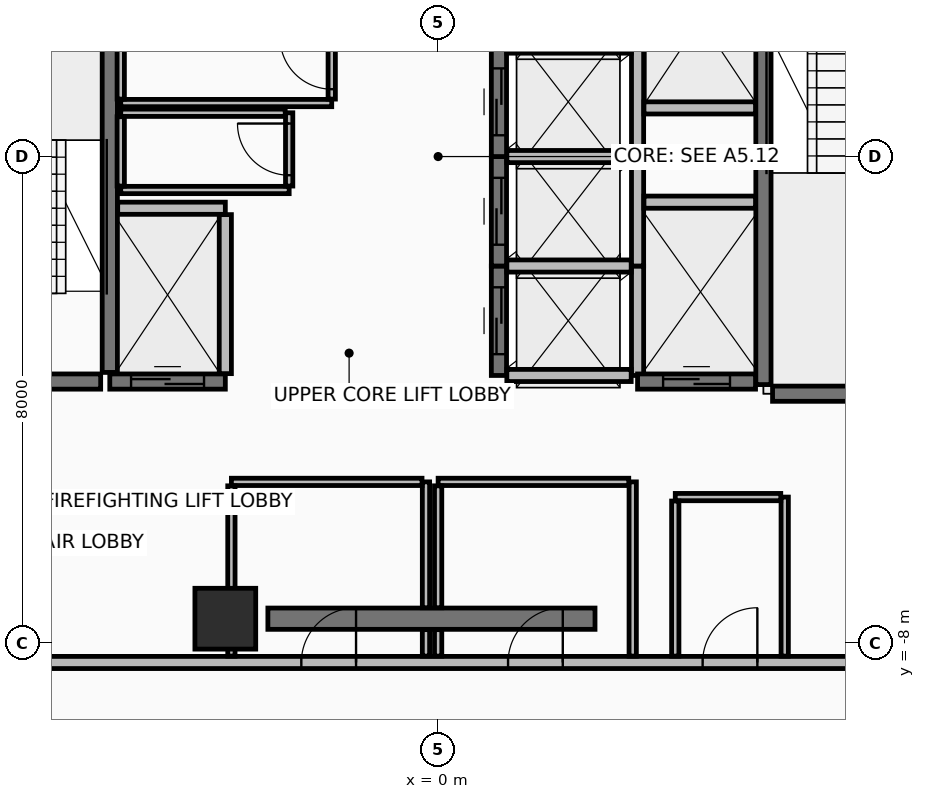
"""IFC4 building model, lengths in metres.
Left out: names, types, materials, properties, quantities, classifications, styles, units other than length and angle.
Written with IfcOpenShell. Run it as: python <this file> out.ifc"""

import sys

from ifc_helpers import new_model, si_unit, direction, frame, frame_2d, origin, origin_2d, place, context, subcontext, project, spatial, rectangle, extrude, element, fill, save


model = new_model("IFC4")
c1 = context("Model", 3, precision=1e-05, world=origin(), true_north=direction((0.0, 1.0)))
c2 = subcontext(c1, "Body", "Model", "MODEL_VIEW")
j1 = project(units=[si_unit("LENGTHUNIT", "METRE"), si_unit("PLANEANGLEUNIT", "RADIAN")], contexts=[c1])
p1 = place(None, origin())
s1 = spatial("IfcSite", under=j1, at=p1, CompositionType="ELEMENT")
p2 = place(p1, origin())
s2 = spatial("IfcBuilding", under=s1, at=p2, CompositionType="ELEMENT")
p3 = place(p2, frame((0.0, 0.0, 264.2)))
s3 = spatial("IfcBuildingStorey", under=s2, at=p3, CompositionType="ELEMENT", Elevation=264.2)
p4 = place(p3, frame((-3.5, -7.6, 0.0), z_axis=(0.0, 0.0, 1.0), x_axis=(1.0, 0.0, 0.0)))
e1 = element("IfcColumn", 1, at=p4, inside=s3, PredefinedType="COLUMN", context=c2, shape_type="SweptSolid", body=[
    extrude(rectangle(XDim=1.0, YDim=1.0, at=origin_2d()), origin(), (0.0, 0.0, 1.0), 3.6),
])
p5 = place(p3, frame((-2.8, -7.6, 0.0), z_axis=(0.0, 0.0, 1.0), x_axis=(1.0, 0.0, 0.0)))
e2 = element("IfcWall", 2, at=p5, inside=s3, PredefinedType="SHEAR", context=c2, shape_type="SweptSolid", body=[
    extrude(rectangle(XDim=5.38, YDim=0.35, at=frame_2d((2.69, 0.0))), origin(), (0.0, 0.0, 1.0), 3.42),
])
p6 = place(p3, frame((-9.62, -8.32, 0.0), z_axis=(0.0, 0.0, 1.0), x_axis=(1.0, 0.0, 0.0)))
e3 = element("IfcWall", 3, at=p6, inside=s3, PredefinedType="PARTITIONING", context=c2, shape_type="SweptSolid", body=[
    extrude(rectangle(XDim=19.24, YDim=0.2, at=frame_2d((9.62, 0.0))), origin(), (0.0, 0.0, 1.0), 2.915),
])
p7 = place(p6, frame((7.37, 0.0, 0.0)))
e4 = element("IfcOpeningElement", 4, at=p7, cuts=e3, PredefinedType="OPENING", context=c2, shape_type="SweptSolid", body=[
    extrude(rectangle(XDim=0.9, YDim=2.1, at=frame_2d((0.45, 1.05))), frame((0.0, 0.11, 0.0), z_axis=(0.0, -1.0, 0.0), x_axis=(1.0, 0.0, 0.0)), (0.0, 0.0, 1.0), 0.22),
])
p8 = place(p6, frame((10.77, 0.0, 0.0)))
e5 = element("IfcOpeningElement", 5, at=p8, cuts=e3, PredefinedType="OPENING", context=c2, shape_type="SweptSolid", body=[
    extrude(rectangle(XDim=0.9, YDim=2.1, at=frame_2d((0.45, 1.05))), frame((0.0, 0.11, 0.0), z_axis=(0.0, -1.0, 0.0), x_axis=(1.0, 0.0, 0.0)), (0.0, 0.0, 1.0), 0.22),
])
p9 = place(p6, frame((13.97, 0.0, 0.0)))
e6 = element("IfcOpeningElement", 6, at=p9, cuts=e3, PredefinedType="OPENING", context=c2, shape_type="SweptSolid", body=[
    extrude(rectangle(XDim=0.9, YDim=2.1, at=frame_2d((0.45, 1.05))), frame((0.0, 0.11, 0.0), z_axis=(0.0, -1.0, 0.0), x_axis=(1.0, 0.0, 0.0)), (0.0, 0.0, 1.0), 0.22),
])
p10 = place(p3, frame((-5.4, -3.55, 0.0), z_axis=(0.0, 0.0, 1.0), x_axis=(0.0, 1.0, 0.0)))
e7 = element("IfcWall", 7, at=p10, inside=s3, PredefinedType="SHEAR", context=c2, shape_type="SweptSolid", body=[
    extrude(rectangle(XDim=7.3, YDim=0.25, at=frame_2d((3.65, 0.0))), origin(), (0.0, 0.0, 1.0), 3.42),
])
p11 = place(p3, frame((-8.5, -3.7, 0.0), z_axis=(0.0, 0.0, 1.0), x_axis=(1.0, 0.0, 0.0)))
e8 = element("IfcWall", 8, at=p11, inside=s3, PredefinedType="SHEAR", context=c2, shape_type="SweptSolid", body=[
    extrude(rectangle(XDim=2.95, YDim=0.25, at=frame_2d((1.475, 0.0))), origin(), (0.0, 0.0, 1.0), 3.42),
])
p12 = place(p11, frame((0.9, 0.0, 0.0)))
e9 = element("IfcOpeningElement", 9, at=p12, cuts=e8, PredefinedType="OPENING", context=c2, shape_type="SweptSolid", body=[
    extrude(rectangle(XDim=1.1, YDim=2.15, at=frame_2d((0.55, 1.075))), frame((0.0, 0.135, 0.0), z_axis=(0.0, -1.0, 0.0), x_axis=(1.0, 0.0, 0.0)), (0.0, 0.0, 1.0), 0.27),
])
p13 = place(p3, frame((5.35, -3.75, 0.0), z_axis=(0.0, 0.0, 1.0), x_axis=(0.0, 1.0, 0.0)))
e10 = element("IfcWall", 10, at=p13, inside=s3, PredefinedType="SHEAR", context=c2, shape_type="SweptSolid", body=[
    extrude(rectangle(XDim=7.3, YDim=0.25, at=frame_2d((3.65, 0.0))), origin(), (0.0, 0.0, 1.0), 3.42),
])
p14 = place(p3, frame((5.5, -3.9, 0.0), z_axis=(0.0, 0.0, 1.0), x_axis=(1.0, 0.0, 0.0)))
e11 = element("IfcWall", 11, at=p14, inside=s3, PredefinedType="SHEAR", context=c2, shape_type="SweptSolid", body=[
    extrude(rectangle(XDim=3.0, YDim=0.25, at=frame_2d((1.5, 0.0))), origin(), (0.0, 0.0, 1.0), 3.42),
])
p15 = place(p3, frame((1.0, -3.6, 0.0), z_axis=(0.0, 0.0, 1.0), x_axis=(0.0, 1.0, 0.0)))
e12 = element("IfcWall", 12, at=p15, inside=s3, PredefinedType="SHEAR", context=c2, shape_type="SweptSolid", body=[
    extrude(rectangle(XDim=1.8, YDim=0.25, at=frame_2d((0.9, 0.0))), origin(), (0.0, 0.0, 1.0), 3.42),
])
p16 = place(p15, frame((0.35, 0.0, 0.0)))
e13 = element("IfcOpeningElement", 13, at=p16, cuts=e12, PredefinedType="OPENING", context=c2, shape_type="SweptSolid", body=[
    extrude(rectangle(XDim=1.1, YDim=2.2, at=frame_2d((0.55, 1.1))), frame((0.0, 0.135, 0.0), z_axis=(0.0, -1.0, 0.0), x_axis=(1.0, 0.0, 0.0)), (0.0, 0.0, 1.0), 0.27),
])
p17 = place(p3, frame((3.28, -3.6, 0.0), z_axis=(0.0, 0.0, 1.0), x_axis=(0.0, 1.0, 0.0)))
e14 = element("IfcWall", 14, at=p17, inside=s3, PredefinedType="PARTITIONING", context=c2, shape_type="SweptSolid", body=[
    extrude(rectangle(XDim=1.8, YDim=0.2, at=frame_2d((0.9, 0.0))), origin(), (0.0, 0.0, 1.0), 3.42),
])
for number, where, z_axis, x_axis in (
    (15, (1.13, -3.6, 0.0), (0.0, 0.0, 1.0), (1.0, 0.0, 0.0)),
    (16, (1.13, -1.8, 0.0), (0.0, 0.0, 1.0), (1.0, 0.0, 0.0)),
):
    element("IfcWall", number, at=place(p3, frame(where, z_axis=z_axis, x_axis=x_axis)), inside=s3, PredefinedType="PARTITIONING", context=c2, shape_type="SweptSolid", body=[
        extrude(rectangle(XDim=2.045, YDim=0.2, at=frame_2d((1.022, 0.0))), origin(), (0.0, 0.0, 1.0), 3.42),
    ])
p18 = place(p3, frame((1.0, -1.8, 0.0), z_axis=(0.0, 0.0, 1.0), x_axis=(0.0, 1.0, 0.0)))
e17 = element("IfcWall", 17, at=p18, inside=s3, PredefinedType="SHEAR", context=c2, shape_type="SweptSolid", body=[
    extrude(rectangle(XDim=1.8, YDim=0.25, at=frame_2d((0.9, 0.0))), origin(), (0.0, 0.0, 1.0), 3.42),
])
p19 = place(p18, frame((0.35, 0.0, 0.0)))
e18 = element("IfcOpeningElement", 18, at=p19, cuts=e17, PredefinedType="OPENING", context=c2, shape_type="SweptSolid", body=[
    extrude(rectangle(XDim=1.1, YDim=2.2, at=frame_2d((0.55, 1.1))), frame((0.0, 0.135, 0.0), z_axis=(0.0, -1.0, 0.0), x_axis=(1.0, 0.0, 0.0)), (0.0, 0.0, 1.0), 0.27),
])
p20 = place(p3, frame((3.28, -1.8, 0.0), z_axis=(0.0, 0.0, 1.0), x_axis=(0.0, 1.0, 0.0)))
e19 = element("IfcWall", 19, at=p20, inside=s3, PredefinedType="PARTITIONING", context=c2, shape_type="SweptSolid", body=[
    extrude(rectangle(XDim=1.8, YDim=0.2, at=frame_2d((0.9, 0.0))), origin(), (0.0, 0.0, 1.0), 3.42),
])
p21 = place(p3, frame((1.13, 0.0, 0.0), z_axis=(0.0, 0.0, 1.0), x_axis=(1.0, 0.0, 0.0)))
e20 = element("IfcWall", 20, at=p21, inside=s3, PredefinedType="PARTITIONING", context=c2, shape_type="SweptSolid", body=[
    extrude(rectangle(XDim=2.045, YDim=0.2, at=frame_2d((1.022, 0.0))), origin(), (0.0, 0.0, 1.0), 3.42),
])
p22 = place(p3, frame((1.0, 0.0, 0.0), z_axis=(0.0, 0.0, 1.0), x_axis=(0.0, 1.0, 0.0)))
e21 = element("IfcWall", 21, at=p22, inside=s3, PredefinedType="SHEAR", context=c2, shape_type="SweptSolid", body=[
    extrude(rectangle(XDim=1.8, YDim=0.25, at=frame_2d((0.9, 0.0))), origin(), (0.0, 0.0, 1.0), 3.42),
])
p23 = place(p22, frame((0.35, 0.0, 0.0)))
e22 = element("IfcOpeningElement", 22, at=p23, cuts=e21, PredefinedType="OPENING", context=c2, shape_type="SweptSolid", body=[
    extrude(rectangle(XDim=1.1, YDim=2.2, at=frame_2d((0.55, 1.1))), frame((0.0, 0.135, 0.0), z_axis=(0.0, -1.0, 0.0), x_axis=(1.0, 0.0, 0.0)), (0.0, 0.0, 1.0), 0.27),
])
p24 = place(p3, frame((3.28, 0.0, 0.0), z_axis=(0.0, 0.0, 1.0), x_axis=(0.0, 1.0, 0.0)))
e23 = element("IfcWall", 23, at=p24, inside=s3, PredefinedType="PARTITIONING", context=c2, shape_type="SweptSolid", body=[
    extrude(rectangle(XDim=1.8, YDim=0.2, at=frame_2d((0.9, 0.0))), origin(), (0.0, 0.0, 1.0), 3.42),
])
p25 = place(p3, frame((1.13, 1.8, 0.0), z_axis=(0.0, 0.0, 1.0), x_axis=(1.0, 0.0, 0.0)))
e24 = element("IfcWall", 24, at=p25, inside=s3, PredefinedType="PARTITIONING", context=c2, shape_type="SweptSolid", body=[
    extrude(rectangle(XDim=2.045, YDim=0.2, at=frame_2d((1.022, 0.0))), origin(), (0.0, 0.0, 1.0), 3.42),
])
p26 = place(p3, frame((-5.4, -3.7, 0.0), z_axis=(0.0, 0.0, 1.0), x_axis=(1.0, 0.0, 0.0)))
e25 = element("IfcWall", 25, at=p26, inside=s3, PredefinedType="SHEAR", context=c2, shape_type="SweptSolid", body=[
    extrude(rectangle(XDim=1.9, YDim=0.25, at=frame_2d((0.95, 0.0))), origin(), (0.0, 0.0, 1.0), 3.42),
])
p27 = place(p26, frame((0.35, 0.0, 0.0)))
e26 = element("IfcOpeningElement", 26, at=p27, cuts=e25, PredefinedType="OPENING", context=c2, shape_type="SweptSolid", body=[
    extrude(rectangle(XDim=1.2, YDim=2.2, at=frame_2d((0.6, 1.1))), frame((0.0, 0.135, 0.0), z_axis=(0.0, -1.0, 0.0), x_axis=(1.0, 0.0, 0.0)), (0.0, 0.0, 1.0), 0.27),
])
p28 = place(p3, frame((-5.27, -0.85, 0.0), z_axis=(0.0, 0.0, 1.0), x_axis=(1.0, 0.0, 0.0)))
e27 = element("IfcWall", 27, at=p28, inside=s3, PredefinedType="PARTITIONING", context=c2, shape_type="SweptSolid", body=[
    extrude(rectangle(XDim=1.77, YDim=0.2, at=frame_2d((0.885, 0.0))), origin(), (0.0, 0.0, 1.0), 3.42),
])
p29 = place(p3, frame((-3.5, -3.57, 0.0), z_axis=(0.0, 0.0, 1.0), x_axis=(0.0, 1.0, 0.0)))
e28 = element("IfcWall", 28, at=p29, inside=s3, PredefinedType="PARTITIONING", context=c2, shape_type="SweptSolid", body=[
    extrude(rectangle(XDim=2.615, YDim=0.2, at=frame_2d((1.308, 0.0))), origin(), (0.0, 0.0, 1.0), 3.42),
])
p30 = place(p3, frame((3.385, 0.8, 0.0), z_axis=(0.0, 0.0, 1.0), x_axis=(1.0, 0.0, 0.0)))
e29 = element("IfcWall", 29, at=p30, inside=s3, PredefinedType="PARTITIONING", context=c2, shape_type="SweptSolid", body=[
    extrude(rectangle(XDim=1.835, YDim=0.2, at=frame_2d((0.917, 0.0))), origin(), (0.0, 0.0, 1.0), 3.42),
])
p31 = place(p3, frame((3.28, -3.7, 0.0), z_axis=(0.0, 0.0, 1.0), x_axis=(1.0, 0.0, 0.0)))
e30 = element("IfcWall", 30, at=p31, inside=s3, PredefinedType="SHEAR", context=c2, shape_type="SweptSolid", body=[
    extrude(rectangle(XDim=1.94, YDim=0.25, at=frame_2d((0.97, 0.0))), origin(), (0.0, 0.0, 1.0), 3.42),
])
p32 = place(p31, frame((0.42, 0.0, 0.0)))
e31 = element("IfcOpeningElement", 31, at=p32, cuts=e30, PredefinedType="OPENING", context=c2, shape_type="SweptSolid", body=[
    extrude(rectangle(XDim=1.1, YDim=2.2, at=frame_2d((0.55, 1.1))), frame((0.0, 0.135, 0.0), z_axis=(0.0, -1.0, 0.0), x_axis=(1.0, 0.0, 0.0)), (0.0, 0.0, 1.0), 0.27),
])
p33 = place(p3, frame((3.385, -0.75, 0.0), z_axis=(0.0, 0.0, 1.0), x_axis=(1.0, 0.0, 0.0)))
e32 = element("IfcWall", 32, at=p33, inside=s3, PredefinedType="PARTITIONING", context=c2, shape_type="SweptSolid", body=[
    extrude(rectangle(XDim=1.835, YDim=0.2, at=frame_2d((0.917, 0.0))), origin(), (0.0, 0.0, 1.0), 3.42),
])
p34 = place(p3, frame((-5.22, 0.88, 0.0), z_axis=(0.0, 0.0, 1.0), x_axis=(1.0, 0.0, 0.0)))
e33 = element("IfcWall", 33, at=p34, inside=s3, PredefinedType="PARTITIONING", context=c2, shape_type="SweptSolid", body=[
    extrude(rectangle(XDim=3.47, YDim=0.12, at=frame_2d((1.735, 0.0))), origin(), (0.0, 0.0, 1.0), 3.42),
])
p35 = place(p3, frame((-1.75, 0.945, 0.0), z_axis=(0.0, 0.0, 1.0), x_axis=(0.0, 1.0, 0.0)))
e34 = element("IfcWall", 34, at=p35, inside=s3, PredefinedType="PARTITIONING", context=c2, shape_type="SweptSolid", body=[
    extrude(rectangle(XDim=1.175, YDim=0.12, at=frame_2d((0.587, 0.0))), origin(), (0.0, 0.0, 1.0), 3.42),
])
p36 = place(p35, frame((0.163, 0.0, 0.0)))
e35 = element("IfcOpeningElement", 35, at=p36, cuts=e34, PredefinedType="OPENING", context=c2, shape_type="SweptSolid", body=[
    extrude(rectangle(XDim=0.85, YDim=2.1, at=frame_2d((0.425, 1.05))), frame((0.0, 0.07, 0.0), z_axis=(0.0, -1.0, 0.0), x_axis=(1.0, 0.0, 0.0)), (0.0, 0.0, 1.0), 0.14),
])
p37 = place(p3, frame((-5.22, 2.055, 0.0), z_axis=(0.0, 0.0, 1.0), x_axis=(0.0, -1.0, 0.0)))
e36 = element("IfcWall", 36, at=p37, inside=s3, PredefinedType="PARTITIONING", context=c2, shape_type="SweptSolid", body=[
    extrude(rectangle(XDim=1.11, YDim=0.12, at=frame_2d((0.555, 0.0))), origin(), (0.0, 0.0, 1.0), 3.42),
])
p38 = place(p3, frame((-5.22, -0.55, 0.0), z_axis=(0.0, 0.0, 1.0), x_axis=(1.0, 0.0, 0.0)))
e37 = element("IfcWall", 37, at=p38, inside=s3, PredefinedType="PARTITIONING", context=c2, shape_type="SweptSolid", body=[
    extrude(rectangle(XDim=2.77, YDim=0.12, at=frame_2d((1.385, 0.0))), origin(), (0.0, 0.0, 1.0), 3.42),
])
p39 = place(p3, frame((-2.45, -0.485, 0.0), z_axis=(0.0, 0.0, 1.0), x_axis=(0.0, 1.0, 0.0)))
e38 = element("IfcWall", 38, at=p39, inside=s3, PredefinedType="PARTITIONING", context=c2, shape_type="SweptSolid", body=[
    extrude(rectangle(XDim=1.205, YDim=0.12, at=frame_2d((0.603, 0.0))), origin(), (0.0, 0.0, 1.0), 3.42),
])
p40 = place(p39, frame((0.178, 0.0, 0.0)))
e39 = element("IfcOpeningElement", 39, at=p40, cuts=e38, PredefinedType="OPENING", context=c2, shape_type="SweptSolid", body=[
    extrude(rectangle(XDim=0.85, YDim=2.1, at=frame_2d((0.425, 1.05))), frame((0.0, 0.07, 0.0), z_axis=(0.0, -1.0, 0.0), x_axis=(1.0, 0.0, 0.0)), (0.0, 0.0, 1.0), 0.14),
])
p41 = place(p3, frame((-2.515, 0.72, 0.0), z_axis=(0.0, 0.0, 1.0), x_axis=(-1.0, 0.0, 0.0)))
e40 = element("IfcWall", 40, at=p41, inside=s3, PredefinedType="PARTITIONING", context=c2, shape_type="SweptSolid", body=[
    extrude(rectangle(XDim=2.705, YDim=0.12, at=frame_2d((1.353, 0.0))), origin(), (0.0, 0.0, 1.0), 3.42),
])
p42 = place(p3, frame((-5.22, 0.655, 0.0), z_axis=(0.0, 0.0, 1.0), x_axis=(0.0, -1.0, 0.0)))
e41 = element("IfcWall", 41, at=p42, inside=s3, PredefinedType="PARTITIONING", context=c2, shape_type="SweptSolid", body=[
    extrude(rectangle(XDim=1.14, YDim=0.12, at=frame_2d((0.57, 0.0))), origin(), (0.0, 0.0, 1.0), 3.42),
])
p43 = place(p3, frame((-0.2, -8.215, 0.0), z_axis=(0.0, 0.0, 1.0), x_axis=(0.0, 1.0, 0.0)))
e42 = element("IfcWall", 42, at=p43, inside=s3, PredefinedType="PARTITIONING", context=c2, shape_type="SweptSolid", body=[
    extrude(rectangle(XDim=0.435, YDim=0.12, at=frame_2d((0.218, 0.0))), origin(), (0.0, 0.0, 1.0), 2.715),
])
p44 = place(p3, frame((-0.2, -7.42, 0.0), z_axis=(0.0, 0.0, 1.0), x_axis=(0.0, 1.0, 0.0)))
e43 = element("IfcWall", 43, at=p44, inside=s3, PredefinedType="PARTITIONING", context=c2, shape_type="SweptSolid", body=[
    extrude(rectangle(XDim=2.07, YDim=0.12, at=frame_2d((1.035, 0.0))), origin(), (0.0, 0.0, 1.0), 2.715),
])
p45 = place(p3, frame((-0.265, -5.35, 0.0), z_axis=(0.0, 0.0, 1.0), x_axis=(-1.0, 0.0, 0.0)))
e44 = element("IfcWall", 44, at=p45, inside=s3, PredefinedType="PARTITIONING", context=c2, shape_type="SweptSolid", body=[
    extrude(rectangle(XDim=3.135, YDim=0.12, at=frame_2d((1.567, 0.0))), origin(), (0.0, 0.0, 1.0), 2.715),
])
p46 = place(p3, frame((-3.4, -5.415, 0.0), z_axis=(0.0, 0.0, 1.0), x_axis=(0.0, -1.0, 0.0)))
e45 = element("IfcWall", 45, at=p46, inside=s3, PredefinedType="PARTITIONING", context=c2, shape_type="SweptSolid", body=[
    extrude(rectangle(XDim=2.8, YDim=0.12, at=frame_2d((1.4, 0.0))), origin(), (0.0, 0.0, 1.0), 2.715),
])
p47 = place(p3, frame((3.2, -8.215, 0.0), z_axis=(0.0, 0.0, 1.0), x_axis=(0.0, 1.0, 0.0)))
e46 = element("IfcWall", 46, at=p47, inside=s3, PredefinedType="PARTITIONING", context=c2, shape_type="SweptSolid", body=[
    extrude(rectangle(XDim=2.865, YDim=0.12, at=frame_2d((1.433, 0.0))), origin(), (0.0, 0.0, 1.0), 2.715),
])
p48 = place(p3, frame((3.135, -5.35, 0.0), z_axis=(0.0, 0.0, 1.0), x_axis=(-1.0, 0.0, 0.0)))
e47 = element("IfcWall", 47, at=p48, inside=s3, PredefinedType="PARTITIONING", context=c2, shape_type="SweptSolid", body=[
    extrude(rectangle(XDim=3.135, YDim=0.12, at=frame_2d((1.567, 0.0))), origin(), (0.0, 0.0, 1.0), 3.42),
])
p49 = place(p3, frame((0.0, -5.415, 0.0), z_axis=(0.0, 0.0, 1.0), x_axis=(0.0, -1.0, 0.0)))
e48 = element("IfcWall", 48, at=p49, inside=s3, PredefinedType="PARTITIONING", context=c2, shape_type="SweptSolid", body=[
    extrude(rectangle(XDim=2.005, YDim=0.12, at=frame_2d((1.002, 0.0))), origin(), (0.0, 0.0, 1.0), 2.715),
])
p50 = place(p3, frame((0.0, -7.78, 0.0), z_axis=(0.0, 0.0, 1.0), x_axis=(0.0, -1.0, 0.0)))
e49 = element("IfcWall", 49, at=p50, inside=s3, PredefinedType="PARTITIONING", context=c2, shape_type="SweptSolid", body=[
    extrude(rectangle(XDim=0.435, YDim=0.12, at=frame_2d((0.218, 0.0))), origin(), (0.0, 0.0, 1.0), 2.715),
])
p51 = place(p3, frame((5.7, -8.215, 0.0), z_axis=(0.0, 0.0, 1.0), x_axis=(0.0, 1.0, 0.0)))
e50 = element("IfcWall", 50, at=p51, inside=s3, PredefinedType="PARTITIONING", context=c2, shape_type="SweptSolid", body=[
    extrude(rectangle(XDim=2.615, YDim=0.12, at=frame_2d((1.308, 0.0))), origin(), (0.0, 0.0, 1.0), 2.715),
])
p52 = place(p3, frame((5.635, -5.6, 0.0), z_axis=(0.0, 0.0, 1.0), x_axis=(-1.0, 0.0, 0.0)))
e51 = element("IfcWall", 51, at=p52, inside=s3, PredefinedType="PARTITIONING", context=c2, shape_type="SweptSolid", body=[
    extrude(rectangle(XDim=1.735, YDim=0.12, at=frame_2d((0.868, 0.0))), origin(), (0.0, 0.0, 1.0), 3.42),
])
p53 = place(p3, frame((3.9, -5.665, 0.0), z_axis=(0.0, 0.0, 1.0), x_axis=(0.0, -1.0, 0.0)))
e52 = element("IfcWall", 52, at=p53, inside=s3, PredefinedType="PARTITIONING", context=c2, shape_type="SweptSolid", body=[
    extrude(rectangle(XDim=2.55, YDim=0.12, at=frame_2d((1.275, 0.0))), origin(), (0.0, 0.0, 1.0), 2.715),
])
p54 = place(p16, origin())
e53 = element("IfcDoor", 53, at=p54, inside=s3, OperationType="SLIDING_TO_LEFT", PredefinedType="DOOR", context=c2, shape_type="SweptSolid", body=[
    extrude(rectangle(XDim=1.1, YDim=2.2, at=frame_2d((0.55, 1.1))), frame((0.0, 0.025, 0.0), z_axis=(0.0, -1.0, 0.0), x_axis=(1.0, 0.0, 0.0)), (0.0, 0.0, 1.0), 0.05),
])
fill(e13, e53)
p55 = place(p19, origin())
e54 = element("IfcDoor", 54, at=p55, inside=s3, OperationType="SLIDING_TO_LEFT", PredefinedType="DOOR", context=c2, shape_type="SweptSolid", body=[
    extrude(rectangle(XDim=1.1, YDim=2.2, at=frame_2d((0.55, 1.1))), frame((0.0, 0.025, 0.0), z_axis=(0.0, -1.0, 0.0), x_axis=(1.0, 0.0, 0.0)), (0.0, 0.0, 1.0), 0.05),
])
fill(e18, e54)
p56 = place(p23, origin())
e55 = element("IfcDoor", 55, at=p56, inside=s3, OperationType="SLIDING_TO_LEFT", PredefinedType="DOOR", context=c2, shape_type="SweptSolid", body=[
    extrude(rectangle(XDim=1.1, YDim=2.2, at=frame_2d((0.55, 1.1))), frame((0.0, 0.025, 0.0), z_axis=(0.0, -1.0, 0.0), x_axis=(1.0, 0.0, 0.0)), (0.0, 0.0, 1.0), 0.05),
])
fill(e22, e55)
p57 = place(p27, origin())
e56 = element("IfcDoor", 56, at=p57, inside=s3, OperationType="SLIDING_TO_RIGHT", PredefinedType="DOOR", context=c2, shape_type="SweptSolid", body=[
    extrude(rectangle(XDim=1.2, YDim=2.2, at=frame_2d((0.6, 1.1))), frame((0.0, 0.025, 0.0), z_axis=(0.0, -1.0, 0.0), x_axis=(1.0, 0.0, 0.0)), (0.0, 0.0, 1.0), 0.05),
])
fill(e26, e56)
p58 = place(p32, origin())
e57 = element("IfcDoor", 57, at=p58, inside=s3, OperationType="SLIDING_TO_LEFT", PredefinedType="DOOR", context=c2, shape_type="SweptSolid", body=[
    extrude(rectangle(XDim=1.1, YDim=2.2, at=frame_2d((0.55, 1.1))), frame((0.0, 0.025, 0.0), z_axis=(0.0, -1.0, 0.0), x_axis=(1.0, 0.0, 0.0)), (0.0, 0.0, 1.0), 0.05),
])
fill(e31, e57)
p59 = place(p36, frame((0.85, 0.0, 0.0), z_axis=(0.0, 0.0, 1.0), x_axis=(-1.0, 0.0, 0.0)))
e58 = element("IfcDoor", 58, at=p59, inside=s3, OperationType="SINGLE_SWING_RIGHT", PredefinedType="DOOR", context=c2, shape_type="SweptSolid", body=[
    extrude(rectangle(XDim=0.85, YDim=2.1, at=frame_2d((0.425, 1.05))), frame((0.0, 0.025, 0.0), z_axis=(0.0, -1.0, 0.0), x_axis=(1.0, 0.0, 0.0)), (0.0, 0.0, 1.0), 0.05),
])
fill(e35, e58)
p60 = place(p40, frame((0.85, 0.0, 0.0), z_axis=(0.0, 0.0, 1.0), x_axis=(-1.0, 0.0, 0.0)))
e59 = element("IfcDoor", 59, at=p60, inside=s3, OperationType="SINGLE_SWING_RIGHT", PredefinedType="DOOR", context=c2, shape_type="SweptSolid", body=[
    extrude(rectangle(XDim=0.85, YDim=2.1, at=frame_2d((0.425, 1.05))), frame((0.0, 0.025, 0.0), z_axis=(0.0, -1.0, 0.0), x_axis=(1.0, 0.0, 0.0)), (0.0, 0.0, 1.0), 0.05),
])
fill(e39, e59)
p61 = place(p7, frame((0.9, 0.0, 0.0), z_axis=(0.0, 0.0, 1.0), x_axis=(-1.0, 0.0, 0.0)))
e60 = element("IfcDoor", 60, at=p61, inside=s3, OperationType="SINGLE_SWING_LEFT", PredefinedType="DOOR", context=c2, shape_type="SweptSolid", body=[
    extrude(rectangle(XDim=0.9, YDim=2.1, at=frame_2d((0.45, 1.05))), frame((0.0, 0.025, 0.0), z_axis=(0.0, -1.0, 0.0), x_axis=(1.0, 0.0, 0.0)), (0.0, 0.0, 1.0), 0.05),
])
fill(e4, e60)
p62 = place(p8, frame((0.9, 0.0, 0.0), z_axis=(0.0, 0.0, 1.0), x_axis=(-1.0, 0.0, 0.0)))
e61 = element("IfcDoor", 61, at=p62, inside=s3, OperationType="SINGLE_SWING_LEFT", PredefinedType="DOOR", context=c2, shape_type="SweptSolid", body=[
    extrude(rectangle(XDim=0.9, YDim=2.1, at=frame_2d((0.45, 1.05))), frame((0.0, 0.025, 0.0), z_axis=(0.0, -1.0, 0.0), x_axis=(1.0, 0.0, 0.0)), (0.0, 0.0, 1.0), 0.05),
])
fill(e5, e61)
p63 = place(p9, frame((0.9, 0.0, 0.0), z_axis=(0.0, 0.0, 1.0), x_axis=(-1.0, 0.0, 0.0)))
e62 = element("IfcDoor", 62, at=p63, inside=s3, OperationType="SINGLE_SWING_LEFT", PredefinedType="DOOR", context=c2, shape_type="SweptSolid", body=[
    extrude(rectangle(XDim=0.9, YDim=2.1, at=frame_2d((0.45, 1.05))), frame((0.0, 0.025, 0.0), z_axis=(0.0, -1.0, 0.0), x_axis=(1.0, 0.0, 0.0)), (0.0, 0.0, 1.0), 0.05),
])
fill(e6, e62)
save(model, sys.argv[1])
